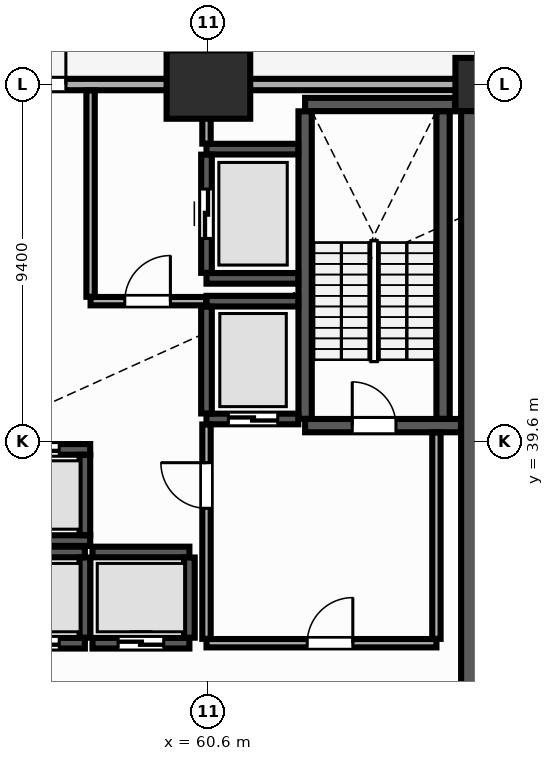
"""IFC4 building model, lengths in metres.
Left out: names, types, materials, properties, quantities, classifications, styles, units other than length and angle.
Written with IfcOpenShell. Run it as: python <this file> out.ifc"""

import sys

from ifc_helpers import new_model, si_unit, direction, frame, frame_2d, origin, origin_2d, place, context, subcontext, project, spatial, rectangle, extrude, element, fill, save


model = new_model("IFC4")
c1 = context("Model", 3, precision=1e-05, world=origin(), true_north=direction((0.0, 1.0)))
c2 = subcontext(c1, "Body", "Model", "MODEL_VIEW")
j1 = project(units=[si_unit("LENGTHUNIT", "METRE"), si_unit("PLANEANGLEUNIT", "RADIAN")], contexts=[c1])
p1 = place(None, origin())
s1 = spatial("IfcSite", under=j1, at=p1, CompositionType="ELEMENT")
p2 = place(p1, origin())
s2 = spatial("IfcBuilding", under=s1, at=p2, CompositionType="ELEMENT")
p3 = place(p2, origin())
s3 = spatial("IfcBuildingStorey", under=s2, at=p3, CompositionType="ELEMENT", Elevation=0.0)
p4 = place(p3, frame((60.6, 49.0, 0.0), z_axis=(0.0, 0.0, 1.0), x_axis=(1.0, 0.0, 0.0)))
e1 = element("IfcColumn", 1, at=p4, inside=s3, PredefinedType="USERDEFINED", context=c2, shape_type="SweptSolid", body=[
    extrude(rectangle(XDim=2.2, YDim=1.8, at=origin_2d()), origin(), (0.0, 0.0, 1.0), 7.68),
])
p5 = place(p3, frame((67.8, 49.0, 0.0), z_axis=(0.0, 0.0, 1.0), x_axis=(1.0, 0.0, 0.0)))
e2 = element("IfcColumn", 2, at=p5, inside=s3, PredefinedType="COLUMN", context=c2, shape_type="SweptSolid", body=[
    extrude(rectangle(XDim=1.4, YDim=1.4, at=origin_2d()), origin(), (0.0, 0.0, 1.0), 7.68),
])
p6 = place(p3, frame((73.5, 49.0, 0.0), z_axis=(0.0, 0.0, 1.0), x_axis=(-1.0, 0.0, 0.0)))
e3 = element("IfcWall", 3, at=p6, inside=s3, PredefinedType="SOLIDWALL", context=c2, shape_type="SweptSolid", body=[
    extrude(rectangle(XDim=63.0, YDim=0.3, at=frame_2d((31.5, 0.0))), origin(), (0.0, 0.0, 1.0), 5.4),
])
p7 = place(p6, frame((46.15, 0.0, 0.0)))
e4 = element("IfcOpeningElement", 4, at=p7, cuts=e3, PredefinedType="OPENING", context=c2, shape_type="SweptSolid", body=[
    extrude(rectangle(XDim=2.0, YDim=2.4, at=frame_2d((1.0, 1.2))), frame((0.0, 0.16, 0.0), z_axis=(0.0, -1.0, 0.0), x_axis=(1.0, 0.0, 0.0)), (0.0, 0.0, 1.0), 0.32),
])
p8 = place(p6, frame((37.6, 0.0, 0.0)))
e5 = element("IfcOpeningElement", 5, at=p8, cuts=e3, PredefinedType="OPENING", context=c2, shape_type="SweptSolid", body=[
    extrude(rectangle(XDim=2.0, YDim=2.4, at=frame_2d((1.0, 1.2))), frame((0.0, 0.16, 0.0), z_axis=(0.0, -1.0, 0.0), x_axis=(1.0, 0.0, 0.0)), (0.0, 0.0, 1.0), 0.32),
])
p9 = place(p6, frame((16.65, 0.0, 0.0)))
e6 = element("IfcOpeningElement", 6, at=p9, cuts=e3, PredefinedType="OPENING", context=c2, shape_type="SweptSolid", body=[
    extrude(rectangle(XDim=2.0, YDim=2.4, at=frame_2d((1.0, 1.2))), frame((0.0, 0.16, 0.0), z_axis=(0.0, -1.0, 0.0), x_axis=(1.0, 0.0, 0.0)), (0.0, 0.0, 1.0), 0.32),
])
p10 = place(p3, frame((67.8, 29.4, 0.0), z_axis=(0.0, 0.0, 1.0), x_axis=(0.0, 1.0, 0.0)))
e7 = element("IfcWall", 7, at=p10, inside=s3, PredefinedType="SHEAR", context=c2, shape_type="SweptSolid", body=[
    extrude(rectangle(XDim=19.2, YDim=1.1, at=frame_2d((9.6, 0.0))), origin(), (0.0, 0.0, 1.0), 7.68),
])
p11 = place(p3, frame((63.145, 40.025, 0.0), z_axis=(0.0, 0.0, 1.0), x_axis=(1.0, 0.0, 0.0)))
e8 = element("IfcWall", 8, at=p11, inside=s3, PredefinedType="SHEAR", context=c2, shape_type="SweptSolid", body=[
    extrude(rectangle(XDim=4.1, YDim=0.35, at=frame_2d((2.05, 0.0))), origin(), (0.0, 0.0, 1.0), 7.68),
])
p12 = place(p11, frame((1.24, 0.0, 0.0)))
e9 = element("IfcOpeningElement", 9, at=p12, cuts=e8, PredefinedType="OPENING", context=c2, shape_type="SweptSolid", body=[
    extrude(rectangle(XDim=1.15, YDim=2.15, at=frame_2d((0.575, 1.075))), frame((0.0, 0.185, 0.0), z_axis=(0.0, -1.0, 0.0), x_axis=(1.0, 0.0, 0.0)), (0.0, 0.0, 1.0), 0.37),
])
p13 = place(p3, frame((63.145, 48.475, 0.0), z_axis=(0.0, 0.0, 1.0), x_axis=(1.0, 0.0, 0.0)))
e10 = element("IfcWall", 10, at=p13, inside=s3, PredefinedType="SHEAR", context=c2, shape_type="SweptSolid", body=[
    extrude(rectangle(XDim=3.95, YDim=0.35, at=frame_2d((1.975, 0.0))), origin(), (0.0, 0.0, 1.0), 7.68),
])
for number, where, z_axis, x_axis in (
    (11, (63.145, 40.205, 0.0), (0.0, 0.0, 1.0), (0.0, 1.0, 0.0)),
    (12, (66.775, 40.205, 0.0), (0.0, 0.0, 1.0), (0.0, 1.0, 0.0)),
):
    element("IfcWall", number, at=place(p3, frame(where, z_axis=z_axis, x_axis=x_axis)), inside=s3, PredefinedType="SHEAR", context=c2, shape_type="SweptSolid", body=[
        extrude(rectangle(XDim=8.09, YDim=0.35, at=frame_2d((4.045, 0.0))), origin(), (0.0, 0.0, 1.0), 7.68),
    ])
p14 = place(p3, frame((54.8, 34.3, 0.0), z_axis=(0.0, 0.0, 1.0), x_axis=(1.0, 0.0, 0.0)))
e13 = element("IfcWall", 13, at=p14, inside=s3, PredefinedType="SHEAR", context=c2, shape_type="SweptSolid", body=[
    extrude(rectangle(XDim=2.55, YDim=0.28, at=frame_2d((1.275, 0.0))), origin(), (0.0, 0.0, 1.0), 7.68),
])
p15 = place(p14, frame((0.675, 0.0, 0.0)))
e14 = element("IfcOpeningElement", 14, at=p15, cuts=e13, PredefinedType="OPENING", context=c2, shape_type="SweptSolid", body=[
    extrude(rectangle(XDim=1.2, YDim=2.25, at=frame_2d((0.6, 1.125))), frame((0.0, 0.15, 0.0), z_axis=(0.0, -1.0, 0.0), x_axis=(1.0, 0.0, 0.0)), (0.0, 0.0, 1.0), 0.3),
])
p16 = place(p3, frame((54.8, 36.7, 0.0), z_axis=(0.0, 0.0, 1.0), x_axis=(1.0, 0.0, 0.0)))
e15 = element("IfcWall", 15, at=p16, inside=s3, PredefinedType="SHEAR", context=c2, shape_type="SweptSolid", body=[
    extrude(rectangle(XDim=2.55, YDim=0.28, at=frame_2d((1.275, 0.0))), origin(), (0.0, 0.0, 1.0), 7.68),
])
p17 = place(p3, frame((57.35, 34.445, 0.0), z_axis=(0.0, 0.0, 1.0), x_axis=(0.0, 1.0, 0.0)))
e16 = element("IfcWall", 16, at=p17, inside=s3, PredefinedType="SHEAR", context=c2, shape_type="SweptSolid", body=[
    extrude(rectangle(XDim=2.11, YDim=0.28, at=frame_2d((1.055, 0.0))), origin(), (0.0, 0.0, 1.0), 7.68),
])
p18 = place(p3, frame((57.55, 34.3, 0.0), z_axis=(0.0, 0.0, 1.0), x_axis=(1.0, 0.0, 0.0)))
e17 = element("IfcWall", 17, at=p18, inside=s3, PredefinedType="SHEAR", context=c2, shape_type="SweptSolid", body=[
    extrude(rectangle(XDim=2.55, YDim=0.28, at=frame_2d((1.275, 0.0))), origin(), (0.0, 0.0, 1.0), 7.68),
])
p19 = place(p18, frame((0.675, 0.0, 0.0)))
e18 = element("IfcOpeningElement", 18, at=p19, cuts=e17, PredefinedType="OPENING", context=c2, shape_type="SweptSolid", body=[
    extrude(rectangle(XDim=1.2, YDim=2.25, at=frame_2d((0.6, 1.125))), frame((0.0, 0.15, 0.0), z_axis=(0.0, -1.0, 0.0), x_axis=(1.0, 0.0, 0.0)), (0.0, 0.0, 1.0), 0.3),
])
p20 = place(p3, frame((57.55, 36.7, 0.0), z_axis=(0.0, 0.0, 1.0), x_axis=(1.0, 0.0, 0.0)))
e19 = element("IfcWall", 19, at=p20, inside=s3, PredefinedType="SHEAR", context=c2, shape_type="SweptSolid", body=[
    extrude(rectangle(XDim=2.55, YDim=0.28, at=frame_2d((1.275, 0.0))), origin(), (0.0, 0.0, 1.0), 7.68),
])
p21 = place(p3, frame((60.1, 34.445, 0.0), z_axis=(0.0, 0.0, 1.0), x_axis=(0.0, 1.0, 0.0)))
e20 = element("IfcWall", 20, at=p21, inside=s3, PredefinedType="SHEAR", context=c2, shape_type="SweptSolid", body=[
    extrude(rectangle(XDim=2.11, YDim=0.28, at=frame_2d((1.055, 0.0))), origin(), (0.0, 0.0, 1.0), 7.68),
])
p22 = place(p3, frame((54.66, 37.0, 0.0), z_axis=(0.0, 0.0, 1.0), x_axis=(1.0, 0.0, 0.0)))
e21 = element("IfcWall", 21, at=p22, inside=s3, PredefinedType="SHEAR", context=c2, shape_type="SweptSolid", body=[
    extrude(rectangle(XDim=2.83, YDim=0.28, at=frame_2d((1.415, 0.0))), origin(), (0.0, 0.0, 1.0), 7.68),
])
p23 = place(p3, frame((54.66, 39.4, 0.0), z_axis=(0.0, 0.0, 1.0), x_axis=(1.0, 0.0, 0.0)))
e22 = element("IfcWall", 22, at=p23, inside=s3, PredefinedType="SHEAR", context=c2, shape_type="SweptSolid", body=[
    extrude(rectangle(XDim=2.83, YDim=0.28, at=frame_2d((1.415, 0.0))), origin(), (0.0, 0.0, 1.0), 7.68),
])
p24 = place(p23, frame((0.815, 0.0, 0.0)))
e23 = element("IfcOpeningElement", 23, at=p24, cuts=e22, PredefinedType="OPENING", context=c2, shape_type="SweptSolid", body=[
    extrude(rectangle(XDim=1.2, YDim=2.25, at=frame_2d((0.6, 1.125))), frame((0.0, 0.15, 0.0), z_axis=(0.0, -1.0, 0.0), x_axis=(1.0, 0.0, 0.0)), (0.0, 0.0, 1.0), 0.3),
])
p25 = place(p3, frame((57.35, 37.145, 0.0), z_axis=(0.0, 0.0, 1.0), x_axis=(0.0, 1.0, 0.0)))
e24 = element("IfcWall", 24, at=p25, inside=s3, PredefinedType="SHEAR", context=c2, shape_type="SweptSolid", body=[
    extrude(rectangle(XDim=2.11, YDim=0.28, at=frame_2d((1.055, 0.0))), origin(), (0.0, 0.0, 1.0), 7.68),
])
p26 = place(p3, frame((60.55, 40.2, 0.0), z_axis=(0.0, 0.0, 1.0), x_axis=(1.0, 0.0, 0.0)))
e25 = element("IfcWall", 25, at=p26, inside=s3, PredefinedType="SHEAR", context=c2, shape_type="SweptSolid", body=[
    extrude(rectangle(XDim=2.415, YDim=0.28, at=frame_2d((1.208, 0.0))), origin(), (0.0, 0.0, 1.0), 7.68),
])
p27 = place(p26, frame((0.575, 0.0, 0.0)))
e26 = element("IfcOpeningElement", 26, at=p27, cuts=e25, PredefinedType="OPENING", context=c2, shape_type="SweptSolid", body=[
    extrude(rectangle(XDim=1.3, YDim=2.3, at=frame_2d((0.65, 1.15))), frame((0.0, 0.15, 0.0), z_axis=(0.0, -1.0, 0.0), x_axis=(1.0, 0.0, 0.0)), (0.0, 0.0, 1.0), 0.3),
])
p28 = place(p3, frame((60.55, 43.3, 0.0), z_axis=(0.0, 0.0, 1.0), x_axis=(1.0, 0.0, 0.0)))
e27 = element("IfcWall", 27, at=p28, inside=s3, PredefinedType="SHEAR", context=c2, shape_type="SweptSolid", body=[
    extrude(rectangle(XDim=2.415, YDim=0.28, at=frame_2d((1.208, 0.0))), origin(), (0.0, 0.0, 1.0), 7.68),
])
p29 = place(p3, frame((60.55, 40.345, 0.0), z_axis=(0.0, 0.0, 1.0), x_axis=(0.0, 1.0, 0.0)))
e28 = element("IfcWall", 28, at=p29, inside=s3, PredefinedType="SHEAR", context=c2, shape_type="SweptSolid", body=[
    extrude(rectangle(XDim=2.81, YDim=0.28, at=frame_2d((1.405, 0.0))), origin(), (0.0, 0.0, 1.0), 7.68),
])
for number, where, z_axis, x_axis in (
    (29, (60.55, 43.9, 0.0), (0.0, 0.0, 1.0), (1.0, 0.0, 0.0)),
    (30, (60.55, 47.3, 0.0), (0.0, 0.0, 1.0), (1.0, 0.0, 0.0)),
):
    element("IfcWall", number, at=place(p3, frame(where, z_axis=z_axis, x_axis=x_axis)), inside=s3, PredefinedType="SHEAR", context=c2, shape_type="SweptSolid", body=[
        extrude(rectangle(XDim=2.415, YDim=0.28, at=frame_2d((1.208, 0.0))), origin(), (0.0, 0.0, 1.0), 7.68),
    ])
p30 = place(p3, frame((60.55, 44.045, 0.0), z_axis=(0.0, 0.0, 1.0), x_axis=(0.0, 1.0, 0.0)))
e31 = element("IfcWall", 31, at=p30, inside=s3, PredefinedType="SHEAR", context=c2, shape_type="SweptSolid", body=[
    extrude(rectangle(XDim=3.11, YDim=0.28, at=frame_2d((1.555, 0.0))), origin(), (0.0, 0.0, 1.0), 7.68),
])
p31 = place(p30, frame((0.905, 0.0, 0.0)))
e32 = element("IfcOpeningElement", 32, at=p31, cuts=e31, PredefinedType="OPENING", context=c2, shape_type="SweptSolid", body=[
    extrude(rectangle(XDim=1.3, YDim=2.3, at=frame_2d((0.65, 1.15))), frame((0.0, 0.15, 0.0), z_axis=(0.0, -1.0, 0.0), x_axis=(1.0, 0.0, 0.0)), (0.0, 0.0, 1.0), 0.3),
])
p32 = place(p3, frame((60.55, 34.3, 0.0), z_axis=(0.0, 0.0, 1.0), x_axis=(1.0, 0.0, 0.0)))
e33 = element("IfcWall", 33, at=p32, inside=s3, PredefinedType="PARTITIONING", context=c2, shape_type="SweptSolid", body=[
    extrude(rectangle(XDim=6.05, YDim=0.22, at=frame_2d((3.025, 0.0))), origin(), (0.0, 0.0, 1.0), 7.68),
])
p33 = place(p32, frame((2.65, 0.0, 0.0)))
e34 = element("IfcOpeningElement", 34, at=p33, cuts=e33, PredefinedType="OPENING", context=c2, shape_type="SweptSolid", body=[
    extrude(rectangle(XDim=1.2, YDim=2.15, at=frame_2d((0.6, 1.075))), frame((0.0, 0.12, 0.0), z_axis=(0.0, -1.0, 0.0), x_axis=(1.0, 0.0, 0.0)), (0.0, 0.0, 1.0), 0.24),
])
p34 = place(p3, frame((60.55, 34.415, 0.0), z_axis=(0.0, 0.0, 1.0), x_axis=(0.0, 1.0, 0.0)))
e35 = element("IfcWall", 35, at=p34, inside=s3, PredefinedType="PARTITIONING", context=c2, shape_type="SweptSolid", body=[
    extrude(rectangle(XDim=5.64, YDim=0.22, at=frame_2d((2.82, 0.0))), origin(), (0.0, 0.0, 1.0), 7.68),
])
p35 = place(p34, frame((3.435, 0.0, 0.0)))
e36 = element("IfcOpeningElement", 36, at=p35, cuts=e35, PredefinedType="OPENING", context=c2, shape_type="SweptSolid", body=[
    extrude(rectangle(XDim=1.2, YDim=2.15, at=frame_2d((0.6, 1.075))), frame((0.0, 0.12, 0.0), z_axis=(0.0, -1.0, 0.0), x_axis=(1.0, 0.0, 0.0)), (0.0, 0.0, 1.0), 0.24),
])
p36 = place(p3, frame((66.6, 34.415, 0.0), z_axis=(0.0, 0.0, 1.0), x_axis=(0.0, 1.0, 0.0)))
e37 = element("IfcWall", 37, at=p36, inside=s3, PredefinedType="PARTITIONING", context=c2, shape_type="SweptSolid", body=[
    extrude(rectangle(XDim=5.43, YDim=0.22, at=frame_2d((2.715, 0.0))), origin(), (0.0, 0.0, 1.0), 7.68),
])
p37 = place(p3, frame((57.5, 43.3, 0.0), z_axis=(0.0, 0.0, 1.0), x_axis=(1.0, 0.0, 0.0)))
e38 = element("IfcWall", 38, at=p37, inside=s3, PredefinedType="PARTITIONING", context=c2, shape_type="SweptSolid", body=[
    extrude(rectangle(XDim=3.04, YDim=0.22, at=frame_2d((1.52, 0.0))), origin(), (0.0, 0.0, 1.0), 7.68),
])
p38 = place(p37, frame((0.9, 0.0, 0.0)))
e39 = element("IfcOpeningElement", 39, at=p38, cuts=e38, PredefinedType="OPENING", context=c2, shape_type="SweptSolid", body=[
    extrude(rectangle(XDim=1.2, YDim=2.15, at=frame_2d((0.6, 1.075))), frame((0.0, 0.12, 0.0), z_axis=(0.0, -1.0, 0.0), x_axis=(1.0, 0.0, 0.0)), (0.0, 0.0, 1.0), 0.24),
])
p39 = place(p3, frame((57.5, 43.415, 0.0), z_axis=(0.0, 0.0, 1.0), x_axis=(0.0, 1.0, 0.0)))
e40 = element("IfcWall", 40, at=p39, inside=s3, PredefinedType="PARTITIONING", context=c2, shape_type="SweptSolid", body=[
    extrude(rectangle(XDim=5.43, YDim=0.22, at=frame_2d((2.715, 0.0))), origin(), (0.0, 0.0, 1.0), 7.68),
])
p40 = place(p3, frame((60.55, 47.445, 0.0), z_axis=(0.0, 0.0, 1.0), x_axis=(0.0, 1.0, 0.0)))
e41 = element("IfcWall", 41, at=p40, inside=s3, PredefinedType="PARTITIONING", context=c2, shape_type="SweptSolid", body=[
    extrude(rectangle(XDim=1.4, YDim=0.22, at=frame_2d((0.7, 0.0))), origin(), (0.0, 0.0, 1.0), 7.68),
])
p41 = place(p12, origin())
e42 = element("IfcDoor", 42, at=p41, inside=s3, OperationType="SINGLE_SWING_LEFT", PredefinedType="DOOR", context=c2, shape_type="SweptSolid", body=[
    extrude(rectangle(XDim=1.15, YDim=2.15, at=frame_2d((0.575, 1.075))), frame((0.0, 0.025, 0.0), z_axis=(0.0, -1.0, 0.0), x_axis=(1.0, 0.0, 0.0)), (0.0, 0.0, 1.0), 0.05),
])
fill(e9, e42)
p42 = place(p15, origin())
e43 = element("IfcDoor", 43, at=p42, inside=s3, OperationType="DOUBLE_DOOR_SLIDING", PredefinedType="DOOR", context=c2, shape_type="SweptSolid", body=[
    extrude(rectangle(XDim=1.2, YDim=2.25, at=frame_2d((0.6, 1.125))), frame((0.0, 0.025, 0.0), z_axis=(0.0, -1.0, 0.0), x_axis=(1.0, 0.0, 0.0)), (0.0, 0.0, 1.0), 0.05),
])
fill(e14, e43)
p43 = place(p19, origin())
e44 = element("IfcDoor", 44, at=p43, inside=s3, OperationType="DOUBLE_DOOR_SLIDING", PredefinedType="DOOR", context=c2, shape_type="SweptSolid", body=[
    extrude(rectangle(XDim=1.2, YDim=2.25, at=frame_2d((0.6, 1.125))), frame((0.0, 0.025, 0.0), z_axis=(0.0, -1.0, 0.0), x_axis=(1.0, 0.0, 0.0)), (0.0, 0.0, 1.0), 0.05),
])
fill(e18, e44)
p44 = place(p24, origin())
e45 = element("IfcDoor", 45, at=p44, inside=s3, OperationType="DOUBLE_DOOR_SLIDING", PredefinedType="DOOR", context=c2, shape_type="SweptSolid", body=[
    extrude(rectangle(XDim=1.2, YDim=2.25, at=frame_2d((0.6, 1.125))), frame((0.0, 0.025, 0.0), z_axis=(0.0, -1.0, 0.0), x_axis=(1.0, 0.0, 0.0)), (0.0, 0.0, 1.0), 0.05),
])
fill(e23, e45)
p45 = place(p27, origin())
e46 = element("IfcDoor", 46, at=p45, inside=s3, OperationType="DOUBLE_DOOR_SLIDING", PredefinedType="DOOR", context=c2, shape_type="SweptSolid", body=[
    extrude(rectangle(XDim=1.3, YDim=2.3, at=frame_2d((0.65, 1.15))), frame((0.0, 0.025, 0.0), z_axis=(0.0, -1.0, 0.0), x_axis=(1.0, 0.0, 0.0)), (0.0, 0.0, 1.0), 0.05),
])
fill(e26, e46)
p46 = place(p31, origin())
e47 = element("IfcDoor", 47, at=p46, inside=s3, OperationType="DOUBLE_DOOR_SLIDING", PredefinedType="DOOR", context=c2, shape_type="SweptSolid", body=[
    extrude(rectangle(XDim=1.3, YDim=2.3, at=frame_2d((0.65, 1.15))), frame((0.0, 0.025, 0.0), z_axis=(0.0, -1.0, 0.0), x_axis=(1.0, 0.0, 0.0)), (0.0, 0.0, 1.0), 0.05),
])
fill(e32, e47)
p47 = place(p33, origin())
e48 = element("IfcDoor", 48, at=p47, inside=s3, OperationType="SINGLE_SWING_RIGHT", PredefinedType="DOOR", context=c2, shape_type="SweptSolid", body=[
    extrude(rectangle(XDim=1.2, YDim=2.15, at=frame_2d((0.6, 1.075))), frame((0.0, 0.025, 0.0), z_axis=(0.0, -1.0, 0.0), x_axis=(1.0, 0.0, 0.0)), (0.0, 0.0, 1.0), 0.05),
])
fill(e34, e48)
p48 = place(p38, origin())
e49 = element("IfcDoor", 49, at=p48, inside=s3, OperationType="SINGLE_SWING_RIGHT", PredefinedType="DOOR", context=c2, shape_type="SweptSolid", body=[
    extrude(rectangle(XDim=1.2, YDim=2.15, at=frame_2d((0.6, 1.075))), frame((0.0, 0.025, 0.0), z_axis=(0.0, -1.0, 0.0), x_axis=(1.0, 0.0, 0.0)), (0.0, 0.0, 1.0), 0.05),
])
fill(e39, e49)
p49 = place(p35, origin())
e50 = element("IfcDoor", 50, at=p49, inside=s3, OperationType="SINGLE_SWING_RIGHT", PredefinedType="DOOR", context=c2, shape_type="SweptSolid", body=[
    extrude(rectangle(XDim=1.2, YDim=2.15, at=frame_2d((0.6, 1.075))), frame((0.0, 0.025, 0.0), z_axis=(0.0, -1.0, 0.0), x_axis=(1.0, 0.0, 0.0)), (0.0, 0.0, 1.0), 0.05),
])
fill(e36, e50)
p50 = place(p9, frame((2.0, 0.0, 0.0), z_axis=(0.0, 0.0, 1.0), x_axis=(-1.0, 0.0, 0.0)))
e51 = element("IfcDoor", 51, at=p50, inside=s3, OperationType="DOUBLE_DOOR_SINGLE_SWING", PredefinedType="DOOR", context=c2, shape_type="SweptSolid", body=[
    extrude(rectangle(XDim=2.0, YDim=2.4, at=frame_2d((1.0, 1.2))), frame((0.0, 0.025, 0.0), z_axis=(0.0, -1.0, 0.0), x_axis=(1.0, 0.0, 0.0)), (0.0, 0.0, 1.0), 0.05),
])
fill(e6, e51)
save(model, sys.argv[1])
